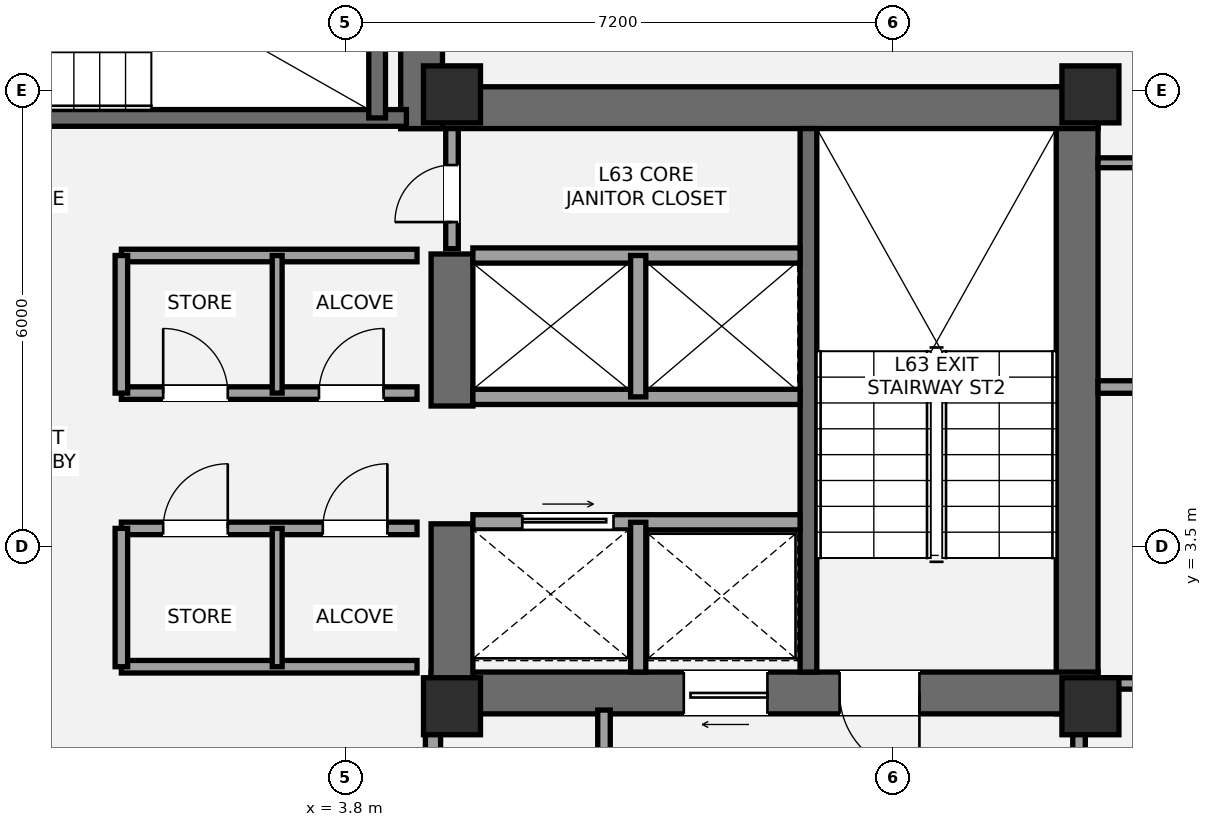
"""IFC4 building model, lengths in metres.
Left out: names, types, materials, properties, quantities, classifications, styles, units other than length and angle.
Written with IfcOpenShell. Run it as: python <this file> out.ifc"""

import sys

from ifc_helpers import new_model, si_unit, direction, frame, frame_2d, origin, origin_2d, place, context, subcontext, project, spatial, rectangle, extrude, element, fill, save


model = new_model("IFC4")
c1 = context("Model", 3, precision=1e-05, world=origin(), true_north=direction((0.0, 1.0)))
c2 = subcontext(c1, "Body", "Model", "MODEL_VIEW")
j1 = project(units=[si_unit("LENGTHUNIT", "METRE"), si_unit("PLANEANGLEUNIT", "RADIAN")], contexts=[c1])
p1 = place(None, origin())
s1 = spatial("IfcSite", under=j1, at=p1, CompositionType="ELEMENT")
p2 = place(p1, origin())
s2 = spatial("IfcBuilding", under=s1, at=p2, CompositionType="ELEMENT")
p3 = place(p2, frame((0.0, 0.0, 225.75)))
s3 = spatial("IfcBuildingStorey", under=s2, at=p3, CompositionType="ELEMENT", Elevation=225.75)
p4 = place(p3, frame((13.425, 1.3, 0.0), z_axis=(0.0, 0.0, 1.0), x_axis=(0.0, 1.0, 0.0)))
e1 = element("IfcWall", 1, at=p4, inside=s3, PredefinedType="SHEAR", context=c2, shape_type="SweptSolid", body=[
    extrude(rectangle(XDim=8.25, YDim=0.55, at=frame_2d((4.125, 0.0))), origin(), (0.0, 0.0, 1.0), 3.15),
])
p5 = place(p3, frame((4.525, 9.275, 0.0), z_axis=(0.0, 0.0, 1.0), x_axis=(1.0, 0.0, 0.0)))
e2 = element("IfcWall", 2, at=p5, inside=s3, PredefinedType="SHEAR", context=c2, shape_type="SweptSolid", body=[
    extrude(rectangle(XDim=9.175, YDim=0.55, at=frame_2d((4.587, 0.0))), origin(), (0.0, 0.0, 1.0), 3.15),
])
p6 = place(p3, frame((13.7, 1.575, 0.0), z_axis=(0.0, 0.0, 1.0), x_axis=(-1.0, 0.0, 0.0)))
e3 = element("IfcWall", 3, at=p6, inside=s3, PredefinedType="SHEAR", context=c2, shape_type="SweptSolid", body=[
    extrude(rectangle(XDim=8.775, YDim=0.55, at=frame_2d((4.387, 0.0))), origin(), (0.0, 0.0, 1.0), 3.15),
])
p7 = place(p6, frame((2.35, 0.0, 0.0)))
e4 = element("IfcOpeningElement", 4, at=p7, cuts=e3, PredefinedType="OPENING", context=c2, shape_type="SweptSolid", body=[
    extrude(rectangle(XDim=1.05, YDim=2.15, at=frame_2d((0.525, 1.075))), frame((0.0, 0.285, 0.0), z_axis=(0.0, -1.0, 0.0), x_axis=(1.0, 0.0, 0.0)), (0.0, 0.0, 1.0), 0.57),
])
p8 = place(p6, frame((4.35, 0.0, 0.0)))
e5 = element("IfcOpeningElement", 5, at=p8, cuts=e3, PredefinedType="OPENING", context=c2, shape_type="SweptSolid", body=[
    extrude(rectangle(XDim=1.1, YDim=2.2, at=frame_2d((0.55, 1.1))), frame((0.0, 0.285, 0.0), z_axis=(0.0, -1.0, 0.0), x_axis=(1.0, 0.0, 0.0)), (0.0, 0.0, 1.0), 0.57),
])
p9 = place(p3, frame((5.2, 1.3, 0.0), z_axis=(0.0, 0.0, 1.0), x_axis=(0.0, 1.0, 0.0)))
e6 = element("IfcWall", 6, at=p9, inside=s3, PredefinedType="SHEAR", context=c2, shape_type="SweptSolid", body=[
    extrude(rectangle(XDim=2.5, YDim=0.55, at=frame_2d((1.25, 0.0))), origin(), (0.0, 0.0, 1.0), 3.15),
])
p10 = place(p3, frame((5.2, 5.35, 0.0), z_axis=(0.0, 0.0, 1.0), x_axis=(0.0, 1.0, 0.0)))
e7 = element("IfcWall", 7, at=p10, inside=s3, PredefinedType="SHEAR", context=c2, shape_type="SweptSolid", body=[
    extrude(rectangle(XDim=2.0, YDim=0.55, at=frame_2d((1.0, 0.0))), origin(), (0.0, 0.0, 1.0), 3.15),
])
p11 = place(p3, frame((9.89, 1.85, 0.0), z_axis=(0.0, 0.0, 1.0), x_axis=(0.0, 1.0, 0.0)))
e8 = element("IfcWall", 8, at=p11, inside=s3, PredefinedType="SHEAR", context=c2, shape_type="SweptSolid", body=[
    extrude(rectangle(XDim=7.15, YDim=0.22, at=frame_2d((3.575, 0.0))), origin(), (0.0, 0.0, 1.0), 3.15),
])
p12 = place(p3, frame((4.8, 9.0, 0.0), z_axis=(0.0, 0.0, 1.0), x_axis=(0.0, 1.0, 0.0)))
e9 = element("IfcWall", 9, at=p12, inside=s3, PredefinedType="SHEAR", context=c2, shape_type="SweptSolid", body=[
    extrude(rectangle(XDim=3.95, YDim=0.55, at=frame_2d((1.975, 0.0))), origin(), (0.0, 0.0, 1.0), 3.15),
])
p13 = place(p3, frame((-4.7, 9.14, 0.0), z_axis=(0.0, 0.0, 1.0), x_axis=(1.0, 0.0, 0.0)))
e10 = element("IfcWall", 10, at=p13, inside=s3, PredefinedType="SHEAR", context=c2, shape_type="SweptSolid", body=[
    extrude(rectangle(XDim=9.3, YDim=0.22, at=frame_2d((4.65, 0.0))), origin(), (0.0, 0.0, 1.0), 3.15),
])
p14 = place(p13, frame((1.15, 0.0, 0.0)))
e11 = element("IfcOpeningElement", 11, at=p14, cuts=e10, PredefinedType="OPENING", context=c2, shape_type="SweptSolid", body=[
    extrude(rectangle(XDim=1.05, YDim=2.15, at=frame_2d((0.525, 1.075))), frame((0.0, 0.12, 0.0), z_axis=(0.0, -1.0, 0.0), x_axis=(1.0, 0.0, 0.0)), (0.0, 0.0, 1.0), 0.24),
])
p15 = place(p3, frame((4.215, 9.14, 0.0), z_axis=(0.0, 0.0, 1.0), x_axis=(0.0, 1.0, 0.0)))
e12 = element("IfcWall", 12, at=p15, inside=s3, PredefinedType="SHEAR", context=c2, shape_type="SweptSolid", body=[
    extrude(rectangle(XDim=3.26, YDim=0.22, at=frame_2d((1.63, 0.0))), origin(), (0.0, 0.0, 1.0), 3.15),
])
for number, where, z_axis, x_axis in (
    (13, (5.2, 1.4, 0.0), (0.0, 0.0, 1.0), (1.0, 0.0, 0.0)),
    (14, (5.2, 9.45, 0.0), (0.0, 0.0, 1.0), (1.0, 0.0, 0.0)),
    (15, (13.6, 1.4, 0.0), (0.0, 0.0, 1.0), (1.0, 0.0, 0.0)),
    (16, (13.6, 9.45, 0.0), (0.0, 0.0, 1.0), (1.0, 0.0, 0.0)),
):
    element("IfcColumn", number, at=place(p3, frame(where, z_axis=z_axis, x_axis=x_axis)), inside=s3, PredefinedType="PILASTER", context=c2, shape_type="SweptSolid", body=[
        extrude(rectangle(XDim=0.75, YDim=0.75, at=origin_2d()), origin(), (0.0, 0.0, 1.0), 3.15),
    ])
p16 = place(p3, frame((14.075, 11.551, 0.0), z_axis=(0.0, 0.0, 1.0), x_axis=(0.827635686249, -0.561265686504, 0.0)))
e17 = element("IfcWall", 17, at=p16, inside=s3, PredefinedType="STANDARD", context=c2, shape_type="SweptSolid", body=[
    extrude(rectangle(XDim=3.749, YDim=0.44, at=frame_2d((1.875, 0.0))), origin(), (0.0, 0.0, 1.0), 2.336),
])
p17 = place(p16, frame((0.5, 0.0, 0.55)))
e18 = element("IfcOpeningElement", 18, at=p17, cuts=e17, PredefinedType="OPENING", context=c2, shape_type="SweptSolid", body=[
    extrude(rectangle(XDim=1.75, YDim=1.55, at=frame_2d((0.875, 0.775))), frame((0.0, 0.23, 0.0), z_axis=(0.0, -1.0, 0.0), x_axis=(1.0, 0.0, 0.0)), (0.0, 0.0, 1.0), 0.46),
])
p18 = place(p3, frame((7.2, -2.15, 0.0), z_axis=(0.0, 0.0, 1.0), x_axis=(0.0, 1.0, 0.0)))
e19 = element("IfcWall", 19, at=p18, inside=s3, PredefinedType="PARTITIONING", context=c2, shape_type="SweptSolid", body=[
    extrude(rectangle(XDim=3.5, YDim=0.165, at=frame_2d((1.75, 0.0))), origin(), (0.0, 0.0, 1.0), 2.423),
])
p19 = place(p3, frame((13.45, -2.15, 0.0), z_axis=(0.0, 0.0, 1.0), x_axis=(0.0, 1.0, 0.0)))
e20 = element("IfcWall", 20, at=p19, inside=s3, PredefinedType="PARTITIONING", context=c2, shape_type="SweptSolid", body=[
    extrude(rectangle(XDim=3.5, YDim=0.165, at=frame_2d((1.75, 0.0))), origin(), (0.0, 0.0, 1.0), 2.423),
])
p20 = place(p19, frame((0.67, 0.0, 0.0)))
e21 = element("IfcOpeningElement", 21, at=p20, cuts=e20, PredefinedType="OPENING", context=c2, shape_type="SweptSolid", body=[
    extrude(rectangle(XDim=1.05, YDim=2.15, at=frame_2d((0.525, 1.075))), frame((0.0, 0.093, 0.0), z_axis=(0.0, -1.0, 0.0), x_axis=(1.0, 0.0, 0.0)), (0.0, 0.0, 1.0), 0.185),
])
p21 = place(p3, frame((4.95, -2.15, 0.0), z_axis=(0.0, 0.0, 1.0), x_axis=(0.0, 1.0, 0.0)))
e22 = element("IfcWall", 22, at=p21, inside=s3, PredefinedType="SOLIDWALL", context=c2, shape_type="SweptSolid", body=[
    extrude(rectangle(XDim=3.5, YDim=0.2, at=frame_2d((1.75, 0.0))), origin(), (0.0, 0.0, 1.0), 2.423),
])
p22 = place(p21, frame((0.95, 0.0, 0.0)))
e23 = element("IfcOpeningElement", 23, at=p22, cuts=e22, PredefinedType="OPENING", context=c2, shape_type="SweptSolid", body=[
    extrude(rectangle(XDim=0.75, YDim=2.1, at=frame_2d((0.375, 1.05))), frame((0.0, 0.11, 0.0), z_axis=(0.0, -1.0, 0.0), x_axis=(1.0, 0.0, 0.0)), (0.0, 0.0, 1.0), 0.22),
])
p23 = place(p3, frame((5.475, 3.82, 0.0), z_axis=(0.0, 0.0, 1.0), x_axis=(1.0, 0.0, 0.0)))
e24 = element("IfcWall", 24, at=p23, inside=s3, PredefinedType="SOLIDWALL", context=c2, shape_type="SweptSolid", body=[
    extrude(rectangle(XDim=4.305, YDim=0.2, at=frame_2d((2.152, 0.0))), origin(), (0.0, 0.0, 1.0), 2.97),
])
p24 = place(p23, frame((0.65, 0.0, 0.0)))
e25 = element("IfcOpeningElement", 25, at=p24, cuts=e24, PredefinedType="OPENING", context=c2, shape_type="SweptSolid", body=[
    extrude(rectangle(XDim=1.2, YDim=2.2, at=frame_2d((0.6, 1.1))), frame((0.0, 0.11, 0.0), z_axis=(0.0, -1.0, 0.0), x_axis=(1.0, 0.0, 0.0)), (0.0, 0.0, 1.0), 0.22),
])
p25 = place(p3, frame((7.65, 1.85, 0.0), z_axis=(0.0, 0.0, 1.0), x_axis=(0.0, 1.0, 0.0)))
e26 = element("IfcWall", 26, at=p25, inside=s3, PredefinedType="SOLIDWALL", context=c2, shape_type="SweptSolid", body=[
    extrude(rectangle(XDim=1.97, YDim=0.2, at=frame_2d((0.985, 0.0))), origin(), (0.0, 0.0, 1.0), 2.97),
])
for number, where, z_axis, x_axis in (
    (27, (5.475, 5.47, 0.0), (0.0, 0.0, 1.0), (1.0, 0.0, 0.0)),
    (28, (5.475, 7.33, 0.0), (0.0, 0.0, 1.0), (1.0, 0.0, 0.0)),
):
    element("IfcWall", number, at=place(p3, frame(where, z_axis=z_axis, x_axis=x_axis)), inside=s3, PredefinedType="SOLIDWALL", context=c2, shape_type="SweptSolid", body=[
        extrude(rectangle(XDim=4.305, YDim=0.2, at=frame_2d((2.152, 0.0))), origin(), (0.0, 0.0, 1.0), 2.97),
    ])
p26 = place(p3, frame((7.65, 5.47, 0.0), z_axis=(0.0, 0.0, 1.0), x_axis=(0.0, 1.0, 0.0)))
e29 = element("IfcWall", 29, at=p26, inside=s3, PredefinedType="SOLIDWALL", context=c2, shape_type="SweptSolid", body=[
    extrude(rectangle(XDim=1.86, YDim=0.2, at=frame_2d((0.93, 0.0))), origin(), (0.0, 0.0, 1.0), 2.97),
])
p27 = place(p3, frame((0.85, 1.92, 0.0), z_axis=(0.0, 0.0, 1.0), x_axis=(1.0, 0.0, 0.0)))
e30 = element("IfcWall", 30, at=p27, inside=s3, PredefinedType="PARTITIONING", context=c2, shape_type="SweptSolid", body=[
    extrude(rectangle(XDim=3.89, YDim=0.165, at=frame_2d((1.945, 0.0))), origin(), (0.0, 0.0, 1.0), 2.11),
])
p28 = place(p3, frame((0.85, 3.74, 0.0), z_axis=(0.0, 0.0, 1.0), x_axis=(1.0, 0.0, 0.0)))
e31 = element("IfcWall", 31, at=p28, inside=s3, PredefinedType="PARTITIONING", context=c2, shape_type="SweptSolid", body=[
    extrude(rectangle(XDim=3.89, YDim=0.165, at=frame_2d((1.945, 0.0))), origin(), (0.0, 0.0, 1.0), 2.97),
])
p29 = place(p28, frame((0.55, 0.0, 0.0)))
e32 = element("IfcOpeningElement", 32, at=p29, cuts=e31, PredefinedType="OPENING", context=c2, shape_type="SweptSolid", body=[
    extrude(rectangle(XDim=0.85, YDim=2.1, at=frame_2d((0.425, 1.05))), frame((0.0, 0.093, 0.0), z_axis=(0.0, -1.0, 0.0), x_axis=(1.0, 0.0, 0.0)), (0.0, 0.0, 1.0), 0.185),
])
p30 = place(p28, frame((2.65, 0.0, 0.0)))
e33 = element("IfcOpeningElement", 33, at=p30, cuts=e31, PredefinedType="OPENING", context=c2, shape_type="SweptSolid", body=[
    extrude(rectangle(XDim=0.85, YDim=2.1, at=frame_2d((0.425, 1.05))), frame((0.0, 0.093, 0.0), z_axis=(0.0, -1.0, 0.0), x_axis=(1.0, 0.0, 0.0)), (0.0, 0.0, 1.0), 0.185),
])
p31 = place(p3, frame((0.85, 1.92, 0.0), z_axis=(0.0, 0.0, 1.0), x_axis=(0.0, 1.0, 0.0)))
e34 = element("IfcWall", 34, at=p31, inside=s3, PredefinedType="PARTITIONING", context=c2, shape_type="SweptSolid", body=[
    extrude(rectangle(XDim=1.82, YDim=0.165, at=frame_2d((0.91, 0.0))), origin(), (0.0, 0.0, 1.0), 2.97),
])
p32 = place(p3, frame((2.9, 1.92, 0.0), z_axis=(0.0, 0.0, 1.0), x_axis=(0.0, 1.0, 0.0)))
e35 = element("IfcWall", 35, at=p32, inside=s3, PredefinedType="PARTITIONING", context=c2, shape_type="SweptSolid", body=[
    extrude(rectangle(XDim=1.82, YDim=0.13, at=frame_2d((0.91, 0.0))), origin(), (0.0, 0.0, 1.0), 2.97),
])
p33 = place(p3, frame((0.85, 5.52, 0.0), z_axis=(0.0, 0.0, 1.0), x_axis=(1.0, 0.0, 0.0)))
e36 = element("IfcWall", 36, at=p33, inside=s3, PredefinedType="PARTITIONING", context=c2, shape_type="SweptSolid", body=[
    extrude(rectangle(XDim=3.89, YDim=0.165, at=frame_2d((1.945, 0.0))), origin(), (0.0, 0.0, 1.0), 2.97),
])
p34 = place(p33, frame((0.55, 0.0, 0.0)))
e37 = element("IfcOpeningElement", 37, at=p34, cuts=e36, PredefinedType="OPENING", context=c2, shape_type="SweptSolid", body=[
    extrude(rectangle(XDim=0.85, YDim=2.1, at=frame_2d((0.425, 1.05))), frame((0.0, 0.093, 0.0), z_axis=(0.0, -1.0, 0.0), x_axis=(1.0, 0.0, 0.0)), (0.0, 0.0, 1.0), 0.185),
])
p35 = place(p33, frame((2.6, 0.0, 0.0)))
e38 = element("IfcOpeningElement", 38, at=p35, cuts=e36, PredefinedType="OPENING", context=c2, shape_type="SweptSolid", body=[
    extrude(rectangle(XDim=0.85, YDim=2.1, at=frame_2d((0.425, 1.05))), frame((0.0, 0.093, 0.0), z_axis=(0.0, -1.0, 0.0), x_axis=(1.0, 0.0, 0.0)), (0.0, 0.0, 1.0), 0.185),
])
p36 = place(p3, frame((0.85, 7.33, 0.0), z_axis=(0.0, 0.0, 1.0), x_axis=(1.0, 0.0, 0.0)))
e39 = element("IfcWall", 39, at=p36, inside=s3, PredefinedType="PARTITIONING", context=c2, shape_type="SweptSolid", body=[
    extrude(rectangle(XDim=3.89, YDim=0.165, at=frame_2d((1.945, 0.0))), origin(), (0.0, 0.0, 1.0), 2.97),
])
p37 = place(p3, frame((0.85, 5.52, 0.0), z_axis=(0.0, 0.0, 1.0), x_axis=(0.0, 1.0, 0.0)))
e40 = element("IfcWall", 40, at=p37, inside=s3, PredefinedType="PARTITIONING", context=c2, shape_type="SweptSolid", body=[
    extrude(rectangle(XDim=1.81, YDim=0.165, at=frame_2d((0.905, 0.0))), origin(), (0.0, 0.0, 1.0), 2.97),
])
p38 = place(p3, frame((2.9, 5.52, 0.0), z_axis=(0.0, 0.0, 1.0), x_axis=(0.0, 1.0, 0.0)))
e41 = element("IfcWall", 41, at=p38, inside=s3, PredefinedType="PARTITIONING", context=c2, shape_type="SweptSolid", body=[
    extrude(rectangle(XDim=1.81, YDim=0.13, at=frame_2d((0.905, 0.0))), origin(), (0.0, 0.0, 1.0), 2.97),
])
p39 = place(p3, frame((5.2, 7.42, 0.0), z_axis=(0.0, 0.0, 1.0), x_axis=(0.0, 1.0, 0.0)))
e42 = element("IfcWall", 42, at=p39, inside=s3, PredefinedType="PARTITIONING", context=c2, shape_type="SweptSolid", body=[
    extrude(rectangle(XDim=1.58, YDim=0.165, at=frame_2d((0.79, 0.0))), origin(), (0.0, 0.0, 1.0), 2.97),
])
p40 = place(p39, frame((0.35, 0.0, 0.0)))
e43 = element("IfcOpeningElement", 43, at=p40, cuts=e42, PredefinedType="OPENING", context=c2, shape_type="SweptSolid", body=[
    extrude(rectangle(XDim=0.75, YDim=2.1, at=frame_2d((0.375, 1.05))), frame((0.0, 0.093, 0.0), z_axis=(0.0, -1.0, 0.0), x_axis=(1.0, 0.0, 0.0)), (0.0, 0.0, 1.0), 0.185),
])
p41 = place(p3, frame((13.7, 5.6, 0.0), z_axis=(0.0, 0.0, 1.0), x_axis=(1.0, 0.0, 0.0)))
e44 = element("IfcWall", 44, at=p41, inside=s3, PredefinedType="PARTITIONING", context=c2, shape_type="SweptSolid", body=[
    extrude(rectangle(XDim=6.698, YDim=0.165, at=frame_2d((3.349, 0.0))), origin(), (0.0, 0.0, 1.0), 2.423),
])
p42 = place(p41, frame((3.352, 0.0, 0.0)))
e45 = element("IfcOpeningElement", 45, at=p42, cuts=e44, PredefinedType="OPENING", context=c2, shape_type="SweptSolid", body=[
    extrude(rectangle(XDim=0.85, YDim=2.1, at=frame_2d((0.425, 1.05))), frame((0.0, 0.093, 0.0), z_axis=(0.0, -1.0, 0.0), x_axis=(1.0, 0.0, 0.0)), (0.0, 0.0, 1.0), 0.185),
])
p43 = place(p3, frame((13.7, 1.7, 0.0), z_axis=(0.0, 0.0, 1.0), x_axis=(1.0, 0.0, 0.0)))
e46 = element("IfcWall", 46, at=p43, inside=s3, PredefinedType="PLUMBINGWALL", context=c2, shape_type="SweptSolid", body=[
    extrude(rectangle(XDim=4.25, YDim=0.15, at=frame_2d((2.125, 0.0))), origin(), (0.0, 0.0, 1.0), 2.423),
])
p44 = place(p43, frame((0.55, 0.0, 0.0)))
e47 = element("IfcOpeningElement", 47, at=p44, cuts=e46, PredefinedType="OPENING", context=c2, shape_type="SweptSolid", body=[
    extrude(rectangle(XDim=0.8, YDim=2.1, at=frame_2d((0.4, 1.05))), frame((0.0, 0.085, 0.0), z_axis=(0.0, -1.0, 0.0), x_axis=(1.0, 0.0, 0.0)), (0.0, 0.0, 1.0), 0.17),
])
p45 = place(p43, frame((2.15, 0.0, 0.0)))
e48 = element("IfcOpeningElement", 48, at=p45, cuts=e46, PredefinedType="OPENING", context=c2, shape_type="SweptSolid", body=[
    extrude(rectangle(XDim=0.85, YDim=2.1, at=frame_2d((0.425, 1.05))), frame((0.0, 0.085, 0.0), z_axis=(0.0, -1.0, 0.0), x_axis=(1.0, 0.0, 0.0)), (0.0, 0.0, 1.0), 0.17),
])
p46 = place(p3, frame((13.7, 8.55, 0.0), z_axis=(0.0, 0.0, 1.0), x_axis=(1.0, 0.0, 0.0)))
e49 = element("IfcWall", 49, at=p46, inside=s3, PredefinedType="PARTITIONING", context=c2, shape_type="SweptSolid", body=[
    extrude(rectangle(XDim=4.085, YDim=0.13, at=frame_2d((2.042, 0.0))), origin(), (0.0, 0.0, 1.0), 2.423),
])
p47 = place(p46, frame((1.891, 0.0, 0.0)))
e50 = element("IfcOpeningElement", 50, at=p47, cuts=e49, PredefinedType="OPENING", context=c2, shape_type="SweptSolid", body=[
    extrude(rectangle(XDim=0.85, YDim=2.1, at=frame_2d((0.425, 1.05))), frame((0.0, 0.075, 0.0), z_axis=(0.0, -1.0, 0.0), x_axis=(1.0, 0.0, 0.0)), (0.0, 0.0, 1.0), 0.15),
])
p48 = place(p7, origin())
e51 = element("IfcDoor", 51, at=p48, inside=s3, OperationType="SINGLE_SWING_LEFT", PredefinedType="DOOR", context=c2, shape_type="SweptSolid", body=[
    extrude(rectangle(XDim=1.05, YDim=2.15, at=frame_2d((0.525, 1.075))), frame((0.0, 0.025, 0.0), z_axis=(0.0, -1.0, 0.0), x_axis=(1.0, 0.0, 0.0)), (0.0, 0.0, 1.0), 0.05),
])
fill(e4, e51)
p49 = place(p8, origin())
e52 = element("IfcDoor", 52, at=p49, inside=s3, OperationType="SLIDING_TO_LEFT", PredefinedType="DOOR", context=c2, shape_type="SweptSolid", body=[
    extrude(rectangle(XDim=1.1, YDim=2.2, at=frame_2d((0.55, 1.1))), frame((0.0, 0.025, 0.0), z_axis=(0.0, -1.0, 0.0), x_axis=(1.0, 0.0, 0.0)), (0.0, 0.0, 1.0), 0.05),
])
fill(e5, e52)
p50 = place(p24, origin())
e53 = element("IfcDoor", 53, at=p50, inside=s3, OperationType="SLIDING_TO_RIGHT", PredefinedType="DOOR", context=c2, shape_type="SweptSolid", body=[
    extrude(rectangle(XDim=1.2, YDim=2.2, at=frame_2d((0.6, 1.1))), frame((0.0, 0.025, 0.0), z_axis=(0.0, -1.0, 0.0), x_axis=(1.0, 0.0, 0.0)), (0.0, 0.0, 1.0), 0.05),
])
fill(e25, e53)
p51 = place(p29, origin())
e54 = element("IfcDoor", 54, at=p51, inside=s3, OperationType="SINGLE_SWING_RIGHT", PredefinedType="DOOR", context=c2, shape_type="SweptSolid", body=[
    extrude(rectangle(XDim=0.85, YDim=2.1, at=frame_2d((0.425, 1.05))), frame((0.0, 0.025, 0.0), z_axis=(0.0, -1.0, 0.0), x_axis=(1.0, 0.0, 0.0)), (0.0, 0.0, 1.0), 0.05),
])
fill(e32, e54)
p52 = place(p30, origin())
e55 = element("IfcDoor", 55, at=p52, inside=s3, OperationType="SINGLE_SWING_RIGHT", PredefinedType="DOOR", context=c2, shape_type="SweptSolid", body=[
    extrude(rectangle(XDim=0.85, YDim=2.1, at=frame_2d((0.425, 1.05))), frame((0.0, 0.025, 0.0), z_axis=(0.0, -1.0, 0.0), x_axis=(1.0, 0.0, 0.0)), (0.0, 0.0, 1.0), 0.05),
])
fill(e33, e55)
p53 = place(p34, origin())
e56 = element("IfcDoor", 56, at=p53, inside=s3, OperationType="SINGLE_SWING_LEFT", PredefinedType="DOOR", context=c2, shape_type="SweptSolid", body=[
    extrude(rectangle(XDim=0.85, YDim=2.1, at=frame_2d((0.425, 1.05))), frame((0.0, 0.025, 0.0), z_axis=(0.0, -1.0, 0.0), x_axis=(1.0, 0.0, 0.0)), (0.0, 0.0, 1.0), 0.05),
])
fill(e37, e56)
p54 = place(p35, origin())
e57 = element("IfcDoor", 57, at=p54, inside=s3, OperationType="SINGLE_SWING_RIGHT", PredefinedType="DOOR", context=c2, shape_type="SweptSolid", body=[
    extrude(rectangle(XDim=0.85, YDim=2.1, at=frame_2d((0.425, 1.05))), frame((0.0, 0.025, 0.0), z_axis=(0.0, -1.0, 0.0), x_axis=(1.0, 0.0, 0.0)), (0.0, 0.0, 1.0), 0.05),
])
fill(e38, e57)
p55 = place(p40, origin())
e58 = element("IfcDoor", 58, at=p55, inside=s3, OperationType="SINGLE_SWING_LEFT", PredefinedType="DOOR", context=c2, shape_type="SweptSolid", body=[
    extrude(rectangle(XDim=0.75, YDim=2.1, at=frame_2d((0.375, 1.05))), frame((0.0, 0.025, 0.0), z_axis=(0.0, -1.0, 0.0), x_axis=(1.0, 0.0, 0.0)), (0.0, 0.0, 1.0), 0.05),
])
fill(e43, e58)
save(model, sys.argv[1])
